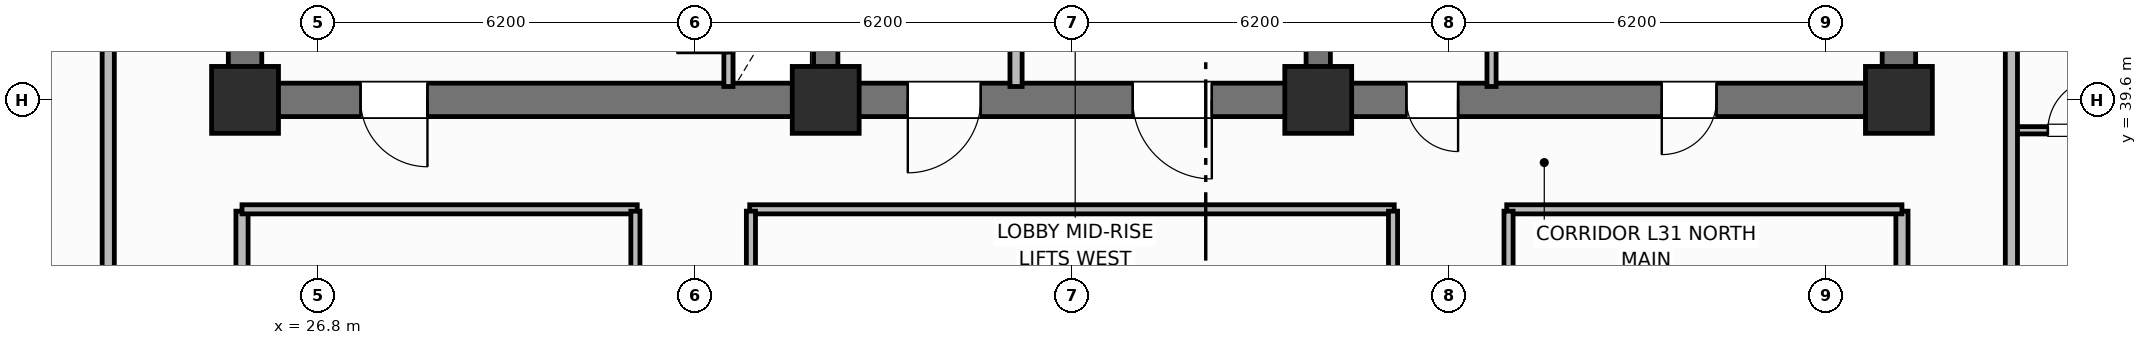
"""IFC4 building model, lengths in metres.
Left out: names, types, materials, properties, quantities, classifications, styles, units other than length and angle.
Written with IfcOpenShell. Run it as: python <this file> out.ifc"""

import sys

from ifc_helpers import new_model, si_unit, direction, frame, frame_2d, origin, origin_2d, place, context, subcontext, project, spatial, rectangle, extrude, element, fill, save


model = new_model("IFC4")
c1 = context("Model", 3, precision=1e-05, world=origin(), true_north=direction((0.0, 1.0)))
c2 = subcontext(c1, "Body", "Model", "MODEL_VIEW")
j1 = project(units=[si_unit("LENGTHUNIT", "METRE"), si_unit("PLANEANGLEUNIT", "RADIAN")], contexts=[c1])
p1 = place(None, origin())
s1 = spatial("IfcSite", under=j1, at=p1, CompositionType="ELEMENT")
p2 = place(p1, origin())
s2 = spatial("IfcBuilding", under=s1, at=p2, CompositionType="ELEMENT")
p3 = place(p2, frame((0.0, 0.0, 125.3)))
s3 = spatial("IfcBuildingStorey", under=s2, at=p3, CompositionType="ELEMENT", Elevation=125.3)
for number, where, z_axis, x_axis in (
    (1, (25.6, 39.875, 0.0), (0.0, 0.0, 1.0), (0.0, 1.0, 0.0)),
    (2, (52.8, 39.875, 0.0), (0.0, 0.0, 1.0), (0.0, 1.0, 0.0)),
):
    element("IfcWall", number, at=place(p3, frame(where, z_axis=z_axis, x_axis=x_axis)), inside=s3, PredefinedType="SHEAR", context=c2, shape_type="SweptSolid", body=[
        extrude(rectangle(XDim=5.65, YDim=0.55, at=frame_2d((2.825, 0.0))), origin(), (0.0, 0.0, 1.0), 3.7),
    ])
p4 = place(p3, frame((52.8, 39.6, 0.0), z_axis=(0.0, 0.0, 1.0), x_axis=(-1.0, 0.0, 0.0)))
e3 = element("IfcWall", 3, at=p4, inside=s3, PredefinedType="SHEAR", context=c2, shape_type="SweptSolid", body=[
    extrude(rectangle(XDim=27.2, YDim=0.55, at=frame_2d((13.6, 0.0))), origin(), (0.0, 0.0, 1.0), 3.7),
])
p5 = place(p4, frame((24.2, 0.0, 0.0)))
e4 = element("IfcOpeningElement", 4, at=p5, cuts=e3, PredefinedType="OPENING", context=c2, shape_type="SweptSolid", body=[
    extrude(rectangle(XDim=1.1, YDim=2.15, at=frame_2d((0.55, 1.075))), frame((0.0, 0.285, 0.0), z_axis=(0.0, -1.0, 0.0), x_axis=(1.0, 0.0, 0.0)), (0.0, 0.0, 1.0), 0.57),
])
p6 = place(p4, frame((15.1, 0.0, 0.0)))
e5 = element("IfcOpeningElement", 5, at=p6, cuts=e3, PredefinedType="OPENING", context=c2, shape_type="SweptSolid", body=[
    extrude(rectangle(XDim=1.2, YDim=2.15, at=frame_2d((0.6, 1.075))), frame((0.0, 0.285, 0.0), z_axis=(0.0, -1.0, 0.0), x_axis=(1.0, 0.0, 0.0)), (0.0, 0.0, 1.0), 0.57),
])
p7 = place(p4, frame((11.3, 0.0, 0.0)))
e6 = element("IfcOpeningElement", 6, at=p7, cuts=e3, PredefinedType="OPENING", context=c2, shape_type="SweptSolid", body=[
    extrude(rectangle(XDim=1.3, YDim=2.2, at=frame_2d((0.65, 1.1))), frame((0.0, 0.285, 0.0), z_axis=(0.0, -1.0, 0.0), x_axis=(1.0, 0.0, 0.0)), (0.0, 0.0, 1.0), 0.57),
])
p8 = place(p4, frame((7.25, 0.0, 0.0)))
e7 = element("IfcOpeningElement", 7, at=p8, cuts=e3, PredefinedType="OPENING", context=c2, shape_type="SweptSolid", body=[
    extrude(rectangle(XDim=0.85, YDim=2.1, at=frame_2d((0.425, 1.05))), frame((0.0, 0.285, 0.0), z_axis=(0.0, -1.0, 0.0), x_axis=(1.0, 0.0, 0.0)), (0.0, 0.0, 1.0), 0.57),
])
p9 = place(p4, frame((3.0, 0.0, 0.0)))
e8 = element("IfcOpeningElement", 8, at=p9, cuts=e3, PredefinedType="OPENING", context=c2, shape_type="SweptSolid", body=[
    extrude(rectangle(XDim=0.9, YDim=2.1, at=frame_2d((0.45, 1.05))), frame((0.0, 0.285, 0.0), z_axis=(0.0, -1.0, 0.0), x_axis=(1.0, 0.0, 0.0)), (0.0, 0.0, 1.0), 0.57),
])
for number, where, z_axis, x_axis in (
    (9, (35.15, 39.875, 0.0), (0.0, 0.0, 1.0), (0.0, 1.0, 0.0)),
    (10, (43.25, 39.875, 0.0), (0.0, 0.0, 1.0), (0.0, 1.0, 0.0)),
):
    element("IfcWall", number, at=place(p3, frame(where, z_axis=z_axis, x_axis=x_axis)), inside=s3, PredefinedType="SHEAR", context=c2, shape_type="SweptSolid", body=[
        extrude(rectangle(XDim=5.65, YDim=0.4, at=frame_2d((2.825, 0.0))), origin(), (0.0, 0.0, 1.0), 3.7),
    ])
for number, where, z_axis, x_axis in (
    (11, (25.6, 39.6, 0.0), (0.0, 0.0, 1.0), (1.0, 0.0, 0.0)),
    (12, (35.15, 39.6, 0.0), (0.0, 0.0, 1.0), (1.0, 0.0, 0.0)),
    (13, (43.25, 39.6, 0.0), (0.0, 0.0, 1.0), (1.0, 0.0, 0.0)),
    (14, (52.8, 39.6, 0.0), (0.0, 0.0, 1.0), (1.0, 0.0, 0.0)),
):
    element("IfcColumn", number, at=place(p3, frame(where, z_axis=z_axis, x_axis=x_axis)), inside=s3, PredefinedType="COLUMN", context=c2, shape_type="SweptSolid", body=[
        extrude(rectangle(XDim=1.1, YDim=1.1, at=origin_2d()), origin(), (0.0, 0.0, 1.0), 3.7),
    ])
p10 = place(p3, frame((33.55, 39.82, 0.0), z_axis=(0.0, 0.0, 1.0), x_axis=(0.0, 1.0, 0.0)))
e15 = element("IfcWall", 15, at=p10, inside=s3, PredefinedType="PARTITIONING", context=c2, shape_type="SweptSolid", body=[
    extrude(rectangle(XDim=2.13, YDim=0.15, at=frame_2d((1.065, 0.0))), origin(), (0.0, 0.0, 1.0), 2.53),
])
p11 = place(p10, frame((0.55, 0.0, 0.0)))
e16 = element("IfcOpeningElement", 16, at=p11, cuts=e15, PredefinedType="OPENING", context=c2, shape_type="SweptSolid", body=[
    extrude(rectangle(XDim=0.85, YDim=2.05, at=frame_2d((0.425, 1.025))), frame((0.0, 0.085, 0.0), z_axis=(0.0, -1.0, 0.0), x_axis=(1.0, 0.0, 0.0)), (0.0, 0.0, 1.0), 0.17),
])
p12 = place(p3, frame((38.28, 39.82, 0.0), z_axis=(0.0, 0.0, 1.0), x_axis=(0.0, 1.0, 0.0)))
e17 = element("IfcWall", 17, at=p12, inside=s3, PredefinedType="PARTITIONING", context=c2, shape_type="SweptSolid", body=[
    extrude(rectangle(XDim=2.73, YDim=0.2, at=frame_2d((1.365, 0.0))), origin(), (0.0, 0.0, 1.0), 2.53),
])
p13 = place(p3, frame((46.1, 39.82, 0.0), z_axis=(0.0, 0.0, 1.0), x_axis=(0.0, 1.0, 0.0)))
e18 = element("IfcWall", 18, at=p13, inside=s3, PredefinedType="PARTITIONING", context=c2, shape_type="SweptSolid", body=[
    extrude(rectangle(XDim=2.73, YDim=0.15, at=frame_2d((1.365, 0.0))), origin(), (0.0, 0.0, 1.0), 2.53),
])
for number, where, z_axis, x_axis in (
    (19, (25.55, 18.63, 0.0), (0.0, 0.0, 1.0), (0.0, 1.0, 0.0)),
    (20, (52.85, 18.63, 0.0), (0.0, 0.0, 1.0), (0.0, 1.0, 0.0)),
):
    element("IfcWall", number, at=place(p3, frame(where, z_axis=z_axis, x_axis=x_axis)), inside=s3, PredefinedType="PARTITIONING", context=c2, shape_type="SweptSolid", body=[
        extrude(rectangle(XDim=19.14, YDim=0.2, at=frame_2d((9.57, 0.0))), origin(), (0.0, 0.0, 1.0), 2.53),
    ])
p14 = place(p3, frame((25.55, 37.8, 0.0), z_axis=(0.0, 0.0, 1.0), x_axis=(1.0, 0.0, 0.0)))
e21 = element("IfcWall", 21, at=p14, inside=s3, PredefinedType="PARTITIONING", context=c2, shape_type="SweptSolid", body=[
    extrude(rectangle(XDim=6.5, YDim=0.15, at=frame_2d((3.25, 0.0))), origin(), (0.0, 0.0, 1.0), 2.53),
])
p15 = place(p3, frame((33.9, 37.8, 0.0), z_axis=(0.0, 0.0, 1.0), x_axis=(1.0, 0.0, 0.0)))
e22 = element("IfcWall", 22, at=p15, inside=s3, PredefinedType="PARTITIONING", context=c2, shape_type="SweptSolid", body=[
    extrude(rectangle(XDim=10.6, YDim=0.15, at=frame_2d((5.3, 0.0))), origin(), (0.0, 0.0, 1.0), 2.53),
])
p16 = place(p3, frame((46.35, 37.8, 0.0), z_axis=(0.0, 0.0, 1.0), x_axis=(1.0, 0.0, 0.0)))
e23 = element("IfcWall", 23, at=p16, inside=s3, PredefinedType="PARTITIONING", context=c2, shape_type="SweptSolid", body=[
    extrude(rectangle(XDim=6.5, YDim=0.15, at=frame_2d((3.25, 0.0))), origin(), (0.0, 0.0, 1.0), 2.53),
])
p17 = place(p3, frame((32.02, 18.63, 0.0), z_axis=(0.0, 0.0, 1.0), x_axis=(0.0, 1.0, 0.0)))
e24 = element("IfcWall", 24, at=p17, inside=s3, PredefinedType="PARTITIONING", context=c2, shape_type="SweptSolid", body=[
    extrude(rectangle(XDim=19.14, YDim=0.15, at=frame_2d((9.57, 0.0))), origin(), (0.0, 0.0, 1.0), 2.53),
])
p18 = place(p17, frame((5.0, 0.0, 0.0)))
e25 = element("IfcOpeningElement", 25, at=p18, cuts=e24, PredefinedType="OPENING", context=c2, shape_type="SweptSolid", body=[
    extrude(rectangle(XDim=0.9, YDim=2.1, at=frame_2d((0.45, 1.05))), frame((0.0, 0.085, 0.0), z_axis=(0.0, -1.0, 0.0), x_axis=(1.0, 0.0, 0.0)), (0.0, 0.0, 1.0), 0.17),
])
p19 = place(p3, frame((33.92, 18.63, 0.0), z_axis=(0.0, 0.0, 1.0), x_axis=(0.0, 1.0, 0.0)))
e26 = element("IfcWall", 26, at=p19, inside=s3, PredefinedType="PARTITIONING", context=c2, shape_type="SweptSolid", body=[
    extrude(rectangle(XDim=19.14, YDim=0.15, at=frame_2d((9.57, 0.0))), origin(), (0.0, 0.0, 1.0), 2.53),
])
p20 = place(p19, frame((6.5, 0.0, 0.0)))
e27 = element("IfcOpeningElement", 27, at=p20, cuts=e26, PredefinedType="OPENING", context=c2, shape_type="SweptSolid", body=[
    extrude(rectangle(XDim=1.0, YDim=2.15, at=frame_2d((0.5, 1.075))), frame((0.0, 0.085, 0.0), z_axis=(0.0, -1.0, 0.0), x_axis=(1.0, 0.0, 0.0)), (0.0, 0.0, 1.0), 0.17),
])
p21 = place(p3, frame((44.48, 18.63, 0.0), z_axis=(0.0, 0.0, 1.0), x_axis=(0.0, 1.0, 0.0)))
e28 = element("IfcWall", 28, at=p21, inside=s3, PredefinedType="PARTITIONING", context=c2, shape_type="SweptSolid", body=[
    extrude(rectangle(XDim=19.14, YDim=0.15, at=frame_2d((9.57, 0.0))), origin(), (0.0, 0.0, 1.0), 2.53),
])
p22 = place(p3, frame((46.38, 18.63, 0.0), z_axis=(0.0, 0.0, 1.0), x_axis=(0.0, 1.0, 0.0)))
e29 = element("IfcWall", 29, at=p22, inside=s3, PredefinedType="PARTITIONING", context=c2, shape_type="SweptSolid", body=[
    extrude(rectangle(XDim=19.14, YDim=0.15, at=frame_2d((9.57, 0.0))), origin(), (0.0, 0.0, 1.0), 2.53),
])
p23 = place(p22, frame((3.0, 0.0, 0.0)))
e30 = element("IfcOpeningElement", 30, at=p23, cuts=e29, PredefinedType="OPENING", context=c2, shape_type="SweptSolid", body=[
    extrude(rectangle(XDim=0.9, YDim=2.1, at=frame_2d((0.45, 1.05))), frame((0.0, 0.085, 0.0), z_axis=(0.0, -1.0, 0.0), x_axis=(1.0, 0.0, 0.0)), (0.0, 0.0, 1.0), 0.17),
])
p24 = place(p22, frame((11.5, 0.0, 0.0)))
e31 = element("IfcOpeningElement", 31, at=p24, cuts=e29, PredefinedType="OPENING", context=c2, shape_type="SweptSolid", body=[
    extrude(rectangle(XDim=0.9, YDim=2.1, at=frame_2d((0.45, 1.05))), frame((0.0, 0.085, 0.0), z_axis=(0.0, -1.0, 0.0), x_axis=(1.0, 0.0, 0.0)), (0.0, 0.0, 1.0), 0.17),
])
p25 = place(p3, frame((23.35, 10.6, 0.0), z_axis=(0.0, 0.0, 1.0), x_axis=(0.0, 1.0, 0.0)))
e32 = element("IfcWall", 32, at=p25, inside=s3, PredefinedType="PARTITIONING", context=c2, shape_type="SweptSolid", body=[
    extrude(rectangle(XDim=35.2, YDim=0.2, at=frame_2d((17.6, 0.0))), origin(), (0.0, 0.0, 1.0), 2.53),
])
p26 = place(p25, frame((2.65, 0.0, 0.0)))
e33 = element("IfcOpeningElement", 33, at=p26, cuts=e32, PredefinedType="OPENING", context=c2, shape_type="SweptSolid", body=[
    extrude(rectangle(XDim=1.0, YDim=2.15, at=frame_2d((0.5, 1.075))), frame((0.0, 0.11, 0.0), z_axis=(0.0, -1.0, 0.0), x_axis=(1.0, 0.0, 0.0)), (0.0, 0.0, 1.0), 0.22),
])
p27 = place(p25, frame((19.95, 0.0, 0.0)))
e34 = element("IfcOpeningElement", 34, at=p27, cuts=e32, PredefinedType="OPENING", context=c2, shape_type="SweptSolid", body=[
    extrude(rectangle(XDim=1.0, YDim=2.15, at=frame_2d((0.5, 1.075))), frame((0.0, 0.11, 0.0), z_axis=(0.0, -1.0, 0.0), x_axis=(1.0, 0.0, 0.0)), (0.0, 0.0, 1.0), 0.22),
])
p28 = place(p3, frame((54.65, 39.1, 0.0), z_axis=(0.0, 0.0, 1.0), x_axis=(1.0, 0.0, 0.0)))
e35 = element("IfcWall", 35, at=p28, inside=s3, PredefinedType="PARTITIONING", context=c2, shape_type="SweptSolid", body=[
    extrude(rectangle(XDim=2.25, YDim=0.12, at=frame_2d((1.125, 0.0))), origin(), (0.0, 0.0, 1.0), 2.53),
])
p29 = place(p28, frame((0.6, 0.0, 0.0)))
e36 = element("IfcOpeningElement", 36, at=p29, cuts=e35, PredefinedType="OPENING", context=c2, shape_type="SweptSolid", body=[
    extrude(rectangle(XDim=0.85, YDim=2.1, at=frame_2d((0.425, 1.05))), frame((0.0, 0.07, 0.0), z_axis=(0.0, -1.0, 0.0), x_axis=(1.0, 0.0, 0.0)), (0.0, 0.0, 1.0), 0.14),
])
p30 = place(p3, frame((54.65, 10.6, 0.0), z_axis=(0.0, 0.0, 1.0), x_axis=(0.0, 1.0, 0.0)))
e37 = element("IfcWall", 37, at=p30, inside=s3, PredefinedType="PARTITIONING", context=c2, shape_type="SweptSolid", body=[
    extrude(rectangle(XDim=35.2, YDim=0.2, at=frame_2d((17.6, 0.0))), origin(), (0.0, 0.0, 1.0), 2.53),
])
p31 = place(p30, frame((2.65, 0.0, 0.0)))
e38 = element("IfcOpeningElement", 38, at=p31, cuts=e37, PredefinedType="OPENING", context=c2, shape_type="SweptSolid", body=[
    extrude(rectangle(XDim=1.0, YDim=2.15, at=frame_2d((0.5, 1.075))), frame((0.0, 0.11, 0.0), z_axis=(0.0, -1.0, 0.0), x_axis=(1.0, 0.0, 0.0)), (0.0, 0.0, 1.0), 0.22),
])
p32 = place(p30, frame((12.518, 0.0, 0.0)))
e39 = element("IfcOpeningElement", 39, at=p32, cuts=e37, PredefinedType="OPENING", context=c2, shape_type="SweptSolid", body=[
    extrude(rectangle(XDim=1.0, YDim=2.15, at=frame_2d((0.5, 1.075))), frame((0.0, 0.11, 0.0), z_axis=(0.0, -1.0, 0.0), x_axis=(1.0, 0.0, 0.0)), (0.0, 0.0, 1.0), 0.22),
])
p33 = place(p30, frame((23.65, 0.0, 0.0)))
e40 = element("IfcOpeningElement", 40, at=p33, cuts=e37, PredefinedType="OPENING", context=c2, shape_type="SweptSolid", body=[
    extrude(rectangle(XDim=1.0, YDim=2.15, at=frame_2d((0.5, 1.075))), frame((0.0, 0.11, 0.0), z_axis=(0.0, -1.0, 0.0), x_axis=(1.0, 0.0, 0.0)), (0.0, 0.0, 1.0), 0.22),
])
p34 = place(p11, origin())
e41 = element("IfcDoor", 41, at=p34, inside=s3, OperationType="SINGLE_SWING_LEFT", PredefinedType="TRAPDOOR", context=c2, shape_type="SweptSolid", body=[
    extrude(rectangle(XDim=0.85, YDim=2.05, at=frame_2d((0.425, 1.025))), frame((0.0, 0.025, 0.0), z_axis=(0.0, -1.0, 0.0), x_axis=(1.0, 0.0, 0.0)), (0.0, 0.0, 1.0), 0.05),
])
fill(e16, e41)
p35 = place(p29, origin())
e42 = element("IfcDoor", 42, at=p35, inside=s3, OperationType="SINGLE_SWING_RIGHT", PredefinedType="DOOR", context=c2, shape_type="SweptSolid", body=[
    extrude(rectangle(XDim=0.85, YDim=2.1, at=frame_2d((0.425, 1.05))), frame((0.0, 0.025, 0.0), z_axis=(0.0, -1.0, 0.0), x_axis=(1.0, 0.0, 0.0)), (0.0, 0.0, 1.0), 0.05),
])
fill(e36, e42)
p36 = place(p5, origin())
e43 = element("IfcDoor", 43, at=p36, inside=s3, OperationType="SINGLE_SWING_LEFT", PredefinedType="DOOR", context=c2, shape_type="SweptSolid", body=[
    extrude(rectangle(XDim=1.1, YDim=2.15, at=frame_2d((0.55, 1.075))), frame((0.0, 0.025, 0.0), z_axis=(0.0, -1.0, 0.0), x_axis=(1.0, 0.0, 0.0)), (0.0, 0.0, 1.0), 0.05),
])
fill(e4, e43)
p37 = place(p6, origin())
e44 = element("IfcDoor", 44, at=p37, inside=s3, OperationType="SINGLE_SWING_RIGHT", PredefinedType="DOOR", context=c2, shape_type="SweptSolid", body=[
    extrude(rectangle(XDim=1.2, YDim=2.15, at=frame_2d((0.6, 1.075))), frame((0.0, 0.025, 0.0), z_axis=(0.0, -1.0, 0.0), x_axis=(1.0, 0.0, 0.0)), (0.0, 0.0, 1.0), 0.05),
])
fill(e5, e44)
p38 = place(p7, origin())
e45 = element("IfcDoor", 45, at=p38, inside=s3, OperationType="SINGLE_SWING_LEFT", PredefinedType="DOOR", context=c2, shape_type="SweptSolid", body=[
    extrude(rectangle(XDim=1.3, YDim=2.2, at=frame_2d((0.65, 1.1))), frame((0.0, 0.025, 0.0), z_axis=(0.0, -1.0, 0.0), x_axis=(1.0, 0.0, 0.0)), (0.0, 0.0, 1.0), 0.05),
])
fill(e6, e45)
p39 = place(p8, origin())
e46 = element("IfcDoor", 46, at=p39, inside=s3, OperationType="SINGLE_SWING_LEFT", PredefinedType="DOOR", context=c2, shape_type="SweptSolid", body=[
    extrude(rectangle(XDim=0.85, YDim=2.1, at=frame_2d((0.425, 1.05))), frame((0.0, 0.025, 0.0), z_axis=(0.0, -1.0, 0.0), x_axis=(1.0, 0.0, 0.0)), (0.0, 0.0, 1.0), 0.05),
])
fill(e7, e46)
p40 = place(p9, origin())
e47 = element("IfcDoor", 47, at=p40, inside=s3, OperationType="SINGLE_SWING_RIGHT", PredefinedType="DOOR", context=c2, shape_type="SweptSolid", body=[
    extrude(rectangle(XDim=0.9, YDim=2.1, at=frame_2d((0.45, 1.05))), frame((0.0, 0.025, 0.0), z_axis=(0.0, -1.0, 0.0), x_axis=(1.0, 0.0, 0.0)), (0.0, 0.0, 1.0), 0.05),
])
fill(e8, e47)
save(model, sys.argv[1])
